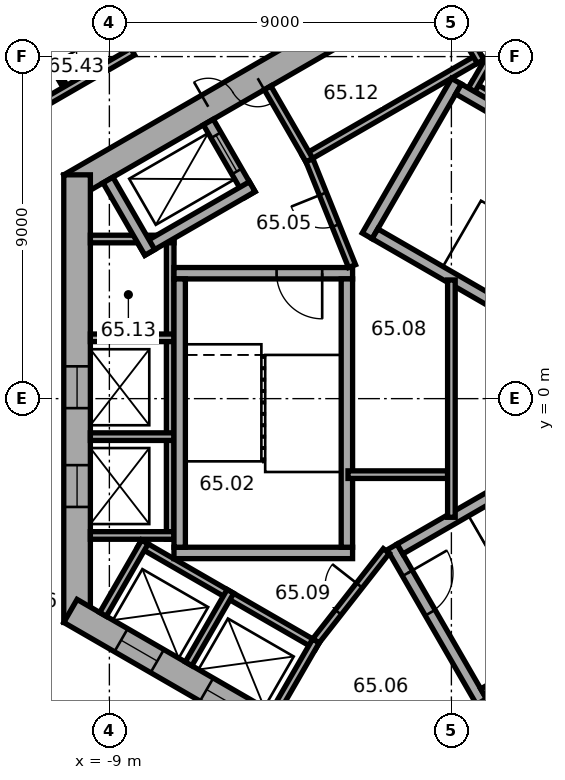
"""IFC4 building model, lengths in metres.
Left out: names, types, materials, properties, quantities, classifications, styles, units other than length and angle.
Written with IfcOpenShell. Run it as: python <this file> out.ifc"""

import sys

from ifc_helpers import new_model, si_unit, direction, frame, frame_2d, origin, place, context, subcontext, project, spatial, rectangle, extrude, element, fill, save


model = new_model("IFC4")
c1 = context("Model", 3, precision=1e-05, world=origin(), true_north=direction((0.0, 1.0)))
c2 = subcontext(c1, "Body", "Model", "MODEL_VIEW")
j1 = project(units=[si_unit("LENGTHUNIT", "METRE"), si_unit("PLANEANGLEUNIT", "RADIAN")], contexts=[c1])
p1 = place(None, origin())
s1 = spatial("IfcSite", under=j1, at=p1, CompositionType="ELEMENT")
p2 = place(p1, origin())
s2 = spatial("IfcBuilding", under=s1, at=p2, CompositionType="ELEMENT")
p3 = place(p2, frame((0.0, 0.0, 263.5)))
s3 = spatial("IfcBuildingStorey", under=s2, at=p3, CompositionType="ELEMENT", Elevation=263.5)
p4 = place(p3, frame((10.025, 5.586, 0.0), z_axis=(0.0, 0.0, 1.0), x_axis=(-0.866026453023, 0.499998182661, 0.0)))
e1 = element("IfcWall", 1, at=p4, inside=s3, PredefinedType="SHEAR", context=c2, shape_type="SweptSolid", body=[
    extrude(rectangle(XDim=11.778, YDim=0.7, at=frame_2d((5.889, 0.0))), origin(), (0.0, 0.0, 1.0), 3.7),
])
p5 = place(p4, frame((5.139, 0.0, 0.0)))
e2 = element("IfcOpeningElement", 2, at=p5, cuts=e1, PredefinedType="OPENING", context=c2, shape_type="SweptSolid", body=[
    extrude(rectangle(XDim=0.9, YDim=2.1, at=frame_2d((0.45, 1.05))), frame((0.0, 0.36, 0.0), z_axis=(0.0, -1.0, 0.0), x_axis=(1.0, 0.0, 0.0)), (0.0, 0.0, 1.0), 0.72),
])
p6 = place(p3, frame((0.175, 11.475, 0.0), z_axis=(0.0, 0.0, 1.0), x_axis=(-0.866026453023, -0.499998182661, 0.0)))
e3 = element("IfcWall", 3, at=p6, inside=s3, PredefinedType="SHEAR", context=c2, shape_type="SweptSolid", body=[
    extrude(rectangle(XDim=11.778, YDim=0.7, at=frame_2d((5.889, 0.0))), origin(), (0.0, 0.0, 1.0), 3.7),
])
p7 = place(p6, frame((6.089, 0.0, 0.0)))
e4 = element("IfcOpeningElement", 4, at=p7, cuts=e3, PredefinedType="OPENING", context=c2, shape_type="SweptSolid", body=[
    extrude(rectangle(XDim=1.5, YDim=2.1, at=frame_2d((0.75, 1.05))), frame((0.0, 0.36, 0.0), z_axis=(0.0, -1.0, 0.0), x_axis=(1.0, 0.0, 0.0)), (0.0, 0.0, 1.0), 0.72),
])
p8 = place(p6, frame((2.939, 0.0, 0.0)))
e5 = element("IfcOpeningElement", 5, at=p8, cuts=e3, PredefinedType="OPENING", context=c2, shape_type="SweptSolid", body=[
    extrude(rectangle(XDim=0.9, YDim=2.1, at=frame_2d((0.45, 1.05))), frame((0.0, 0.36, 0.0), z_axis=(0.0, -1.0, 0.0), x_axis=(1.0, 0.0, 0.0)), (0.0, 0.0, 1.0), 0.72),
])
p9 = place(p3, frame((-9.85, 5.889, 0.0), z_axis=(0.0, 0.0, 1.0), x_axis=(0.0, -1.0, 0.0)))
e6 = element("IfcWall", 6, at=p9, inside=s3, PredefinedType="SHEAR", context=c2, shape_type="SweptSolid", body=[
    extrude(rectangle(XDim=11.778, YDim=0.7, at=frame_2d((5.889, 0.0))), origin(), (0.0, 0.0, 1.0), 3.7),
])
p10 = place(p9, frame((5.039, 0.0, 0.0)))
e7 = element("IfcOpeningElement", 7, at=p10, cuts=e6, PredefinedType="OPENING", context=c2, shape_type="SweptSolid", body=[
    extrude(rectangle(XDim=1.1, YDim=2.1, at=frame_2d((0.55, 1.05))), frame((0.0, 0.36, 0.0), z_axis=(0.0, -1.0, 0.0), x_axis=(1.0, 0.0, 0.0)), (0.0, 0.0, 1.0), 0.72),
])
p11 = place(p9, frame((7.639, 0.0, 0.0)))
e8 = element("IfcOpeningElement", 8, at=p11, cuts=e6, PredefinedType="OPENING", context=c2, shape_type="SweptSolid", body=[
    extrude(rectangle(XDim=1.1, YDim=2.1, at=frame_2d((0.55, 1.05))), frame((0.0, 0.36, 0.0), z_axis=(0.0, -1.0, 0.0), x_axis=(1.0, 0.0, 0.0)), (0.0, 0.0, 1.0), 0.72),
])
p12 = place(p3, frame((-10.025, -5.586, 0.0), z_axis=(0.0, 0.0, 1.0), x_axis=(0.866026453023, -0.499998182661, 0.0)))
e9 = element("IfcWall", 9, at=p12, inside=s3, PredefinedType="SHEAR", context=c2, shape_type="SweptSolid", body=[
    extrude(rectangle(XDim=11.778, YDim=0.7, at=frame_2d((5.889, 0.0))), origin(), (0.0, 0.0, 1.0), 3.7),
])
p13 = place(p12, frame((6.089, 0.0, 0.0)))
e10 = element("IfcOpeningElement", 10, at=p13, cuts=e9, PredefinedType="OPENING", context=c2, shape_type="SweptSolid", body=[
    extrude(rectangle(XDim=1.5, YDim=2.1, at=frame_2d((0.75, 1.05))), frame((0.0, 0.36, 0.0), z_axis=(0.0, -1.0, 0.0), x_axis=(1.0, 0.0, 0.0)), (0.0, 0.0, 1.0), 0.72),
])
p14 = place(p12, frame((1.539, 0.0, 0.0)))
e11 = element("IfcOpeningElement", 11, at=p14, cuts=e9, PredefinedType="OPENING", context=c2, shape_type="SweptSolid", body=[
    extrude(rectangle(XDim=1.1, YDim=2.1, at=frame_2d((0.55, 1.05))), frame((0.0, 0.36, 0.0), z_axis=(0.0, -1.0, 0.0), x_axis=(1.0, 0.0, 0.0)), (0.0, 0.0, 1.0), 0.72),
])
p15 = place(p12, frame((4.139, 0.0, 0.0)))
e12 = element("IfcOpeningElement", 12, at=p15, cuts=e9, PredefinedType="OPENING", context=c2, shape_type="SweptSolid", body=[
    extrude(rectangle(XDim=1.1, YDim=2.1, at=frame_2d((0.55, 1.05))), frame((0.0, 0.36, 0.0), z_axis=(0.0, -1.0, 0.0), x_axis=(1.0, 0.0, 0.0)), (0.0, 0.0, 1.0), 0.72),
])
p16 = place(p3, frame((-0.175, -11.475, 0.0), z_axis=(0.0, 0.0, 1.0), x_axis=(0.866026453023, 0.499998182661, 0.0)))
e13 = element("IfcWall", 13, at=p16, inside=s3, PredefinedType="SHEAR", context=c2, shape_type="SweptSolid", body=[
    extrude(rectangle(XDim=11.778, YDim=0.7, at=frame_2d((5.889, 0.0))), origin(), (0.0, 0.0, 1.0), 3.7),
])
p17 = place(p16, frame((2.439, 0.0, 0.0)))
e14 = element("IfcOpeningElement", 14, at=p17, cuts=e13, PredefinedType="OPENING", context=c2, shape_type="SweptSolid", body=[
    extrude(rectangle(XDim=1.1, YDim=2.1, at=frame_2d((0.55, 1.05))), frame((0.0, 0.36, 0.0), z_axis=(0.0, -1.0, 0.0), x_axis=(1.0, 0.0, 0.0)), (0.0, 0.0, 1.0), 0.72),
])
p18 = place(p16, frame((5.039, 0.0, 0.0)))
e15 = element("IfcOpeningElement", 15, at=p18, cuts=e13, PredefinedType="OPENING", context=c2, shape_type="SweptSolid", body=[
    extrude(rectangle(XDim=1.1, YDim=2.1, at=frame_2d((0.55, 1.05))), frame((0.0, 0.36, 0.0), z_axis=(0.0, -1.0, 0.0), x_axis=(1.0, 0.0, 0.0)), (0.0, 0.0, 1.0), 0.72),
])
p19 = place(p16, frame((7.639, 0.0, 0.0)))
e16 = element("IfcOpeningElement", 16, at=p19, cuts=e13, PredefinedType="OPENING", context=c2, shape_type="SweptSolid", body=[
    extrude(rectangle(XDim=1.1, YDim=2.1, at=frame_2d((0.55, 1.05))), frame((0.0, 0.36, 0.0), z_axis=(0.0, -1.0, 0.0), x_axis=(1.0, 0.0, 0.0)), (0.0, 0.0, 1.0), 0.72),
])
p20 = place(p3, frame((7.424, 4.259, 0.0), z_axis=(0.0, 0.0, 1.0), x_axis=(-0.866026010844, 0.49999894854, 0.0)))
e17 = element("IfcWall", 17, at=p20, inside=s3, PredefinedType="PARTITIONING", context=c2, shape_type="SweptSolid", body=[
    extrude(rectangle(XDim=8.0, YDim=0.2, at=frame_2d((4.0, 0.0))), origin(), (0.0, 0.0, 1.0), 3.42),
])
p21 = place(p3, frame((0.532, 8.122, 0.0), z_axis=(0.0, 0.0, 1.0), x_axis=(0.500077893725, 0.86598042715, 0.0)))
e18 = element("IfcWall", 18, at=p21, inside=s3, PredefinedType="PARTITIONING", context=c2, shape_type="SweptSolid", body=[
    extrude(rectangle(XDim=2.2, YDim=0.2, at=frame_2d((1.1, 0.0))), origin(), (0.0, 0.0, 1.0), 3.42),
])
p22 = place(p3, frame((0.803, 9.009, 0.0), z_axis=(0.0, 0.0, 1.0), x_axis=(-0.866028230842, -0.499995103361, 0.0)))
e19 = element("IfcWall", 19, at=p22, inside=s3, PredefinedType="PARTITIONING", context=c2, shape_type="SweptSolid", body=[
    extrude(rectangle(XDim=5.4, YDim=0.2, at=frame_2d((2.7, 0.0))), origin(), (0.0, 0.0, 1.0), 3.42),
])
p23 = place(p3, frame((0.767, 8.872, 0.0), z_axis=(0.0, 0.0, 1.0), x_axis=(-0.499994660107, 0.866028486751, 0.0)))
e20 = element("IfcWall", 20, at=p23, inside=s3, PredefinedType="PARTITIONING", context=c2, shape_type="SweptSolid", body=[
    extrude(rectangle(XDim=2.2, YDim=0.2, at=frame_2d((1.1, 0.0))), origin(), (0.0, 0.0, 1.0), 3.42),
])
p24 = place(p3, frame((-3.737, 6.272, 0.0), z_axis=(0.0, 0.0, 1.0), x_axis=(-0.50002983664, 0.866008176907, 0.0)))
e21 = element("IfcWall", 21, at=p24, inside=s3, PredefinedType="PARTITIONING", context=c2, shape_type="SweptSolid", body=[
    extrude(rectangle(XDim=2.2, YDim=0.2, at=frame_2d((1.1, 0.0))), origin(), (0.0, 0.0, 1.0), 3.42),
])
p25 = place(p3, frame((-7.4, 4.3, 0.0), z_axis=(0.0, 0.0, 1.0), x_axis=(0.0, -1.0, 0.0)))
e22 = element("IfcWall", 22, at=p25, inside=s3, PredefinedType="PARTITIONING", context=c2, shape_type="SweptSolid", body=[
    extrude(rectangle(XDim=8.0, YDim=0.2, at=frame_2d((4.0, 0.0))), origin(), (0.0, 0.0, 1.0), 3.42),
])
for number, where, z_axis, x_axis in (
    (23, (-7.3, 4.2, 0.0), (0.0, 0.0, 1.0), (-1.0, 0.0, 0.0)),
    (24, (-7.3, 1.6, 0.0), (0.0, 0.0, 1.0), (-1.0, 0.0, 0.0)),
    (25, (-7.3, -1.0, 0.0), (0.0, 0.0, 1.0), (-1.0, 0.0, 0.0)),
    (26, (-7.3, -3.6, 0.0), (0.0, 0.0, 1.0), (-1.0, 0.0, 0.0)),
):
    element("IfcWall", number, at=place(p3, frame(where, z_axis=z_axis, x_axis=x_axis)), inside=s3, PredefinedType="PARTITIONING", context=c2, shape_type="SweptSolid", body=[
        extrude(rectangle(XDim=2.2, YDim=0.2, at=frame_2d((1.1, 0.0))), origin(), (0.0, 0.0, 1.0), 3.42),
    ])
p26 = place(p3, frame((-8.203, -3.809, 0.0), z_axis=(0.0, 0.0, 1.0), x_axis=(0.866028230842, -0.499995103361, 0.0)))
e27 = element("IfcWall", 27, at=p26, inside=s3, PredefinedType="PARTITIONING", context=c2, shape_type="SweptSolid", body=[
    extrude(rectangle(XDim=5.4, YDim=0.2, at=frame_2d((2.7, 0.0))), origin(), (0.0, 0.0, 1.0), 3.42),
])
for number, where, z_axis, x_axis in (
    (28, (-8.067, -3.772, 0.0), (0.0, 0.0, 1.0), (-0.5, -0.866, 0.0)),
    (29, (-5.815, -5.072, 0.0), (0.0, 0.0, 1.0), (-0.5, -0.866, 0.0)),
):
    element("IfcWall", number, at=place(p3, frame(where, z_axis=z_axis, x_axis=x_axis)), inside=s3, PredefinedType="PARTITIONING", context=c2, shape_type="SweptSolid", body=[
        extrude(rectangle(XDim=2.2, YDim=0.2, at=frame_2d((1.1, 0.0))), origin(), (0.0, 0.0, 1.0), 3.42),
    ])
p27 = place(p3, frame((-3.563, -6.372, 0.0), z_axis=(0.0, 0.0, 1.0), x_axis=(-0.499994660107, -0.866028486751, 0.0)))
e30 = element("IfcWall", 30, at=p27, inside=s3, PredefinedType="PARTITIONING", context=c2, shape_type="SweptSolid", body=[
    extrude(rectangle(XDim=2.2, YDim=0.2, at=frame_2d((1.1, 0.0))), origin(), (0.0, 0.0, 1.0), 3.42),
])
p28 = place(p3, frame((-0.024, -8.559, 0.0), z_axis=(0.0, 0.0, 1.0), x_axis=(0.866026010844, 0.49999894854, 0.0)))
e31 = element("IfcWall", 31, at=p28, inside=s3, PredefinedType="PARTITIONING", context=c2, shape_type="SweptSolid", body=[
    extrude(rectangle(XDim=8.0, YDim=0.2, at=frame_2d((4.0, 0.0))), origin(), (0.0, 0.0, 1.0), 3.42),
])
p29 = place(p3, frame((-2.216, 4.282, 0.0), z_axis=(0.0, 0.0, 1.0), x_axis=(0.499977259774, 0.866038532462, 0.0)))
e32 = element("IfcWall", 32, at=p29, inside=s3, PredefinedType="SHEAR", context=c2, shape_type="SweptSolid", body=[
    extrude(rectangle(XDim=4.7, YDim=0.3, at=frame_2d((2.35, 0.0))), origin(), (0.0, 0.0, 1.0), 3.42),
])
for number, where, z_axis, x_axis in (
    (33, (4.103, 0.807, 0.0), (0.0, 0.0, 1.0), (-0.866, 0.5, 0.0)),
    (34, (6.303, 4.617, 0.0), (0.0, 0.0, 1.0), (-0.866, 0.5, 0.0)),
):
    element("IfcWall", number, at=place(p3, frame(where, z_axis=z_axis, x_axis=x_axis)), inside=s3, PredefinedType="SHEAR", context=c2, shape_type="SweptSolid", body=[
        extrude(rectangle(XDim=7.06, YDim=0.3, at=frame_2d((3.53, 0.0))), origin(), (0.0, 0.0, 1.0), 3.42),
    ])
p30 = place(p3, frame((-2.6, 3.3, 0.0), z_axis=(0.0, 0.0, 1.0), x_axis=(-1.0, 0.0, 0.0)))
e35 = element("IfcWall", 35, at=p30, inside=s3, PredefinedType="SHEAR", context=c2, shape_type="SweptSolid", body=[
    extrude(rectangle(XDim=4.7, YDim=0.3, at=frame_2d((2.35, 0.0))), origin(), (0.0, 0.0, 1.0), 3.42),
])
p31 = place(p30, frame((0.8, 0.0, 0.0)))
e36 = element("IfcOpeningElement", 36, at=p31, cuts=e35, PredefinedType="OPENING", context=c2, shape_type="SweptSolid", body=[
    extrude(rectangle(XDim=1.2, YDim=2.1, at=frame_2d((0.6, 1.05))), frame((0.0, 0.16, 0.0), z_axis=(0.0, -1.0, 0.0), x_axis=(1.0, 0.0, 0.0)), (0.0, 0.0, 1.0), 0.32),
])
p32 = place(p3, frame((-2.6, -4.06, 0.0), z_axis=(0.0, 0.0, 1.0), x_axis=(-1.0, 0.0, 0.0)))
e37 = element("IfcWall", 37, at=p32, inside=s3, PredefinedType="SHEAR", context=c2, shape_type="SweptSolid", body=[
    extrude(rectangle(XDim=4.7, YDim=0.3, at=frame_2d((2.35, 0.0))), origin(), (0.0, 0.0, 1.0), 3.42),
])
for number, where, z_axis, x_axis in (
    (38, (-2.75, 3.15, 0.0), (0.0, 0.0, 1.0), (0.0, -1.0, 0.0)),
    (39, (-7.15, 3.15, 0.0), (0.0, 0.0, 1.0), (0.0, -1.0, 0.0)),
):
    element("IfcWall", number, at=place(p3, frame(where, z_axis=z_axis, x_axis=x_axis)), inside=s3, PredefinedType="SHEAR", context=c2, shape_type="SweptSolid", body=[
        extrude(rectangle(XDim=7.06, YDim=0.3, at=frame_2d((3.53, 0.0))), origin(), (0.0, 0.0, 1.0), 3.42),
    ])
p33 = place(p3, frame((-1.558, -3.902, 0.0), z_axis=(0.0, 0.0, 1.0), x_axis=(0.499977259774, -0.866038532462, 0.0)))
e40 = element("IfcWall", 40, at=p33, inside=s3, PredefinedType="SHEAR", context=c2, shape_type="SweptSolid", body=[
    extrude(rectangle(XDim=4.7, YDim=0.3, at=frame_2d((2.35, 0.0))), origin(), (0.0, 0.0, 1.0), 3.42),
])
p34 = place(p33, frame((0.8, 0.0, 0.0)))
e41 = element("IfcOpeningElement", 41, at=p34, cuts=e40, PredefinedType="OPENING", context=c2, shape_type="SweptSolid", body=[
    extrude(rectangle(XDim=1.2, YDim=2.1, at=frame_2d((0.6, 1.05))), frame((0.0, 0.16, 0.0), z_axis=(0.0, -1.0, 0.0), x_axis=(1.0, 0.0, 0.0)), (0.0, 0.0, 1.0), 0.32),
])
for number, where, z_axis, x_axis in (
    (42, (-1.353, -3.957, 0.0), (0.0, 0.0, 1.0), (0.866, 0.5, 0.0)),
    (43, (0.847, -7.767, 0.0), (0.0, 0.0, 1.0), (0.866, 0.5, 0.0)),
):
    element("IfcWall", number, at=place(p3, frame(where, z_axis=z_axis, x_axis=x_axis)), inside=s3, PredefinedType="SHEAR", context=c2, shape_type="SweptSolid", body=[
        extrude(rectangle(XDim=7.06, YDim=0.3, at=frame_2d((3.53, 0.0))), origin(), (0.0, 0.0, 1.0), 3.42),
    ])
p35 = place(p3, frame((-5.295, 5.372, 0.0), z_axis=(0.0, 0.0, 1.0), x_axis=(-0.500077893725, 0.86598042715, 0.0)))
e44 = element("IfcWall", 44, at=p35, inside=s3, PredefinedType="SHEAR", context=c2, shape_type="SweptSolid", body=[
    extrude(rectangle(XDim=2.2, YDim=0.3, at=frame_2d((1.1, 0.0))), origin(), (0.0, 0.0, 1.0), 3.42),
])
p36 = place(p35, frame((0.7, 0.0, 0.0)))
e45 = element("IfcOpeningElement", 45, at=p36, cuts=e44, PredefinedType="OPENING", context=c2, shape_type="SweptSolid", body=[
    extrude(rectangle(XDim=1.1, YDim=2.1, at=frame_2d((0.55, 1.05))), frame((0.0, 0.16, 0.0), z_axis=(0.0, -1.0, 0.0), x_axis=(1.0, 0.0, 0.0)), (0.0, 0.0, 1.0), 0.32),
])
p37 = place(p3, frame((-5.24, 5.577, 0.0), z_axis=(0.0, 0.0, 1.0), x_axis=(-0.866014461049, -0.500018952895, 0.0)))
e46 = element("IfcWall", 46, at=p37, inside=s3, PredefinedType="SHEAR", context=c2, shape_type="SweptSolid", body=[
    extrude(rectangle(XDim=3.35, YDim=0.3, at=frame_2d((1.675, 0.0))), origin(), (0.0, 0.0, 1.0), 3.42),
])
p38 = place(p3, frame((-7.937, 3.847, 0.0), z_axis=(0.0, 0.0, 1.0), x_axis=(-0.50002983664, 0.866008176907, 0.0)))
e47 = element("IfcWall", 47, at=p38, inside=s3, PredefinedType="SHEAR", context=c2, shape_type="SweptSolid", body=[
    extrude(rectangle(XDim=2.2, YDim=0.3, at=frame_2d((1.1, 0.0))), origin(), (0.0, 0.0, 1.0), 3.42),
])
p39 = place(p3, frame((-2.615, 3.487, 0.0), z_axis=(0.0, 0.0, 1.0), x_axis=(-0.373576831041, 0.92759924068, 0.0)))
e48 = element("IfcWall", 48, at=p39, inside=s3, PredefinedType="PARTITIONING", context=c2, shape_type="SweptSolid", body=[
    extrude(rectangle(XDim=3.002, YDim=0.2, at=frame_2d((1.501, 0.0))), origin(), (0.0, 0.0, 1.0), 3.42),
])
p40 = place(p39, frame((1.15, 0.0, 0.0)))
e49 = element("IfcOpeningElement", 49, at=p40, cuts=e48, PredefinedType="OPENING", context=c2, shape_type="SweptSolid", body=[
    extrude(rectangle(XDim=0.9, YDim=2.1, at=frame_2d((0.45, 1.05))), frame((0.0, 0.11, 0.0), z_axis=(0.0, -1.0, 0.0), x_axis=(1.0, 0.0, 0.0)), (0.0, 0.0, 1.0), 0.22),
])
p41 = place(p3, frame((-1.712, -4.008, 0.0), z_axis=(0.0, 0.0, 1.0), x_axis=(-0.616549420702, -0.787316208287, 0.0)))
e50 = element("IfcWall", 50, at=p41, inside=s3, PredefinedType="PARTITIONING", context=c2, shape_type="SweptSolid", body=[
    extrude(rectangle(XDim=3.002, YDim=0.2, at=frame_2d((1.501, 0.0))), origin(), (0.0, 0.0, 1.0), 3.42),
])
p42 = place(p41, frame((1.15, 0.0, 0.0)))
e51 = element("IfcOpeningElement", 51, at=p42, cuts=e50, PredefinedType="OPENING", context=c2, shape_type="SweptSolid", body=[
    extrude(rectangle(XDim=0.9, YDim=2.1, at=frame_2d((0.45, 1.05))), frame((0.0, 0.11, 0.0), z_axis=(0.0, -1.0, 0.0), x_axis=(1.0, 0.0, 0.0)), (0.0, 0.0, 1.0), 0.22),
])
p43 = place(p3, frame((-2.72, -2.0, 0.0), z_axis=(0.0, 0.0, 1.0), x_axis=(1.0, 0.0, 0.0)))
e52 = element("IfcWall", 52, at=p43, inside=s3, PredefinedType="PARTITIONING", context=c2, shape_type="SweptSolid", body=[
    extrude(rectangle(XDim=2.62, YDim=0.2, at=frame_2d((1.31, 0.0))), origin(), (0.0, 0.0, 1.0), 3.42),
])
p44 = place(p3, frame((0.0, -3.122, 0.0), z_axis=(0.0, 0.0, 1.0), x_axis=(0.0, 1.0, 0.0)))
e53 = element("IfcWall", 53, at=p44, inside=s3, PredefinedType="PARTITIONING", context=c2, shape_type="SweptSolid", body=[
    extrude(rectangle(XDim=6.245, YDim=0.2, at=frame_2d((3.122, 0.0))), origin(), (0.0, 0.0, 1.0), 3.42),
])
p45 = place(p3, frame((-10.169, 8.216, 0.0), z_axis=(0.0, 0.0, 1.0), x_axis=(-0.500030632641, 0.866007717299, 0.0)))
e54 = element("IfcWall", 54, at=p45, inside=s3, PredefinedType="PARTITIONING", context=c2, shape_type="SweptSolid", body=[
    extrude(rectangle(XDim=2.24, YDim=0.12, at=frame_2d((1.12, 0.0))), origin(), (0.0, 0.0, 1.0), 3.42),
])
p46 = place(p45, frame((0.67, 0.0, 0.0)))
e55 = element("IfcOpeningElement", 55, at=p46, cuts=e54, PredefinedType="OPENING", context=c2, shape_type="SweptSolid", body=[
    extrude(rectangle(XDim=0.9, YDim=2.1, at=frame_2d((0.45, 1.05))), frame((0.0, 0.07, 0.0), z_axis=(0.0, -1.0, 0.0), x_axis=(1.0, 0.0, 0.0)), (0.0, 0.0, 1.0), 0.14),
])
p47 = place(p3, frame((-8.387, 9.13, 0.0), z_axis=(0.0, 0.0, 1.0), x_axis=(-0.866026878644, -0.499997445459, 0.0)))
e56 = element("IfcWall", 56, at=p47, inside=s3, PredefinedType="PARTITIONING", context=c2, shape_type="SweptSolid", body=[
    extrude(rectangle(XDim=3.151, YDim=0.2, at=frame_2d((1.575, 0.0))), origin(), (0.0, 0.0, 1.0), 3.42),
])
p48 = place(p7, origin())
e57 = element("IfcDoor", 57, at=p48, inside=s3, OperationType="DOUBLE_DOOR_SINGLE_SWING", PredefinedType="DOOR", context=c2, shape_type="SweptSolid", body=[
    extrude(rectangle(XDim=1.5, YDim=2.1, at=frame_2d((0.75, 1.05))), frame((0.0, 0.025, 0.0), z_axis=(0.0, -1.0, 0.0), x_axis=(1.0, 0.0, 0.0)), (0.0, 0.0, 1.0), 0.05),
])
fill(e4, e57)
p49 = place(p31, origin())
e58 = element("IfcDoor", 58, at=p49, inside=s3, OperationType="SINGLE_SWING_RIGHT", PredefinedType="DOOR", context=c2, shape_type="SweptSolid", body=[
    extrude(rectangle(XDim=1.2, YDim=2.1, at=frame_2d((0.6, 1.05))), frame((0.0, 0.025, 0.0), z_axis=(0.0, -1.0, 0.0), x_axis=(1.0, 0.0, 0.0)), (0.0, 0.0, 1.0), 0.05),
])
fill(e36, e58)
p50 = place(p34, origin())
e59 = element("IfcDoor", 59, at=p50, inside=s3, OperationType="SINGLE_SWING_RIGHT", PredefinedType="DOOR", context=c2, shape_type="SweptSolid", body=[
    extrude(rectangle(XDim=1.2, YDim=2.1, at=frame_2d((0.6, 1.05))), frame((0.0, 0.025, 0.0), z_axis=(0.0, -1.0, 0.0), x_axis=(1.0, 0.0, 0.0)), (0.0, 0.0, 1.0), 0.05),
])
fill(e41, e59)
p51 = place(p40, origin())
e60 = element("IfcDoor", 60, at=p51, inside=s3, OperationType="SINGLE_SWING_LEFT", PredefinedType="DOOR", context=c2, shape_type="SweptSolid", body=[
    extrude(rectangle(XDim=0.9, YDim=2.1, at=frame_2d((0.45, 1.05))), frame((0.0, 0.025, 0.0), z_axis=(0.0, -1.0, 0.0), x_axis=(1.0, 0.0, 0.0)), (0.0, 0.0, 1.0), 0.05),
])
fill(e49, e60)
p52 = place(p42, origin())
e61 = element("IfcDoor", 61, at=p52, inside=s3, OperationType="SINGLE_SWING_LEFT", PredefinedType="DOOR", context=c2, shape_type="SweptSolid", body=[
    extrude(rectangle(XDim=0.9, YDim=2.1, at=frame_2d((0.45, 1.05))), frame((0.0, 0.025, 0.0), z_axis=(0.0, -1.0, 0.0), x_axis=(1.0, 0.0, 0.0)), (0.0, 0.0, 1.0), 0.05),
])
fill(e51, e61)
p53 = place(p36, origin())
e62 = element("IfcDoor", 62, at=p53, inside=s3, OperationType="DOUBLE_DOOR_SLIDING", PredefinedType="DOOR", context=c2, shape_type="SweptSolid", body=[
    extrude(rectangle(XDim=1.1, YDim=2.1, at=frame_2d((0.55, 1.05))), frame((0.0, 0.025, 0.0), z_axis=(0.0, -1.0, 0.0), x_axis=(1.0, 0.0, 0.0)), (0.0, 0.0, 1.0), 0.05),
])
fill(e45, e62)
p54 = place(p10, origin())
e63 = element("IfcDoor", 63, at=p54, inside=s3, OperationType="DOUBLE_DOOR_SLIDING", PredefinedType="DOOR", context=c2, shape_type="SweptSolid", body=[
    extrude(rectangle(XDim=1.1, YDim=2.1, at=frame_2d((0.55, 1.05))), frame((0.0, 0.025, 0.0), z_axis=(0.0, -1.0, 0.0), x_axis=(1.0, 0.0, 0.0)), (0.0, 0.0, 1.0), 0.05),
])
fill(e7, e63)
p55 = place(p11, origin())
e64 = element("IfcDoor", 64, at=p55, inside=s3, OperationType="DOUBLE_DOOR_SLIDING", PredefinedType="DOOR", context=c2, shape_type="SweptSolid", body=[
    extrude(rectangle(XDim=1.1, YDim=2.1, at=frame_2d((0.55, 1.05))), frame((0.0, 0.025, 0.0), z_axis=(0.0, -1.0, 0.0), x_axis=(1.0, 0.0, 0.0)), (0.0, 0.0, 1.0), 0.05),
])
fill(e8, e64)
p56 = place(p14, origin())
e65 = element("IfcDoor", 65, at=p56, inside=s3, OperationType="DOUBLE_DOOR_SLIDING", PredefinedType="DOOR", context=c2, shape_type="SweptSolid", body=[
    extrude(rectangle(XDim=1.1, YDim=2.1, at=frame_2d((0.55, 1.05))), frame((0.0, 0.025, 0.0), z_axis=(0.0, -1.0, 0.0), x_axis=(1.0, 0.0, 0.0)), (0.0, 0.0, 1.0), 0.05),
])
fill(e11, e65)
p57 = place(p15, origin())
e66 = element("IfcDoor", 66, at=p57, inside=s3, OperationType="DOUBLE_DOOR_SLIDING", PredefinedType="DOOR", context=c2, shape_type="SweptSolid", body=[
    extrude(rectangle(XDim=1.1, YDim=2.1, at=frame_2d((0.55, 1.05))), frame((0.0, 0.025, 0.0), z_axis=(0.0, -1.0, 0.0), x_axis=(1.0, 0.0, 0.0)), (0.0, 0.0, 1.0), 0.05),
])
fill(e12, e66)
p58 = place(p46, origin())
e67 = element("IfcDoor", 67, at=p58, inside=s3, OperationType="SINGLE_SWING_LEFT", PredefinedType="DOOR", context=c2, shape_type="SweptSolid", body=[
    extrude(rectangle(XDim=0.9, YDim=2.1, at=frame_2d((0.45, 1.05))), frame((0.0, 0.025, 0.0), z_axis=(0.0, -1.0, 0.0), x_axis=(1.0, 0.0, 0.0)), (0.0, 0.0, 1.0), 0.05),
])
fill(e55, e67)
save(model, sys.argv[1])
